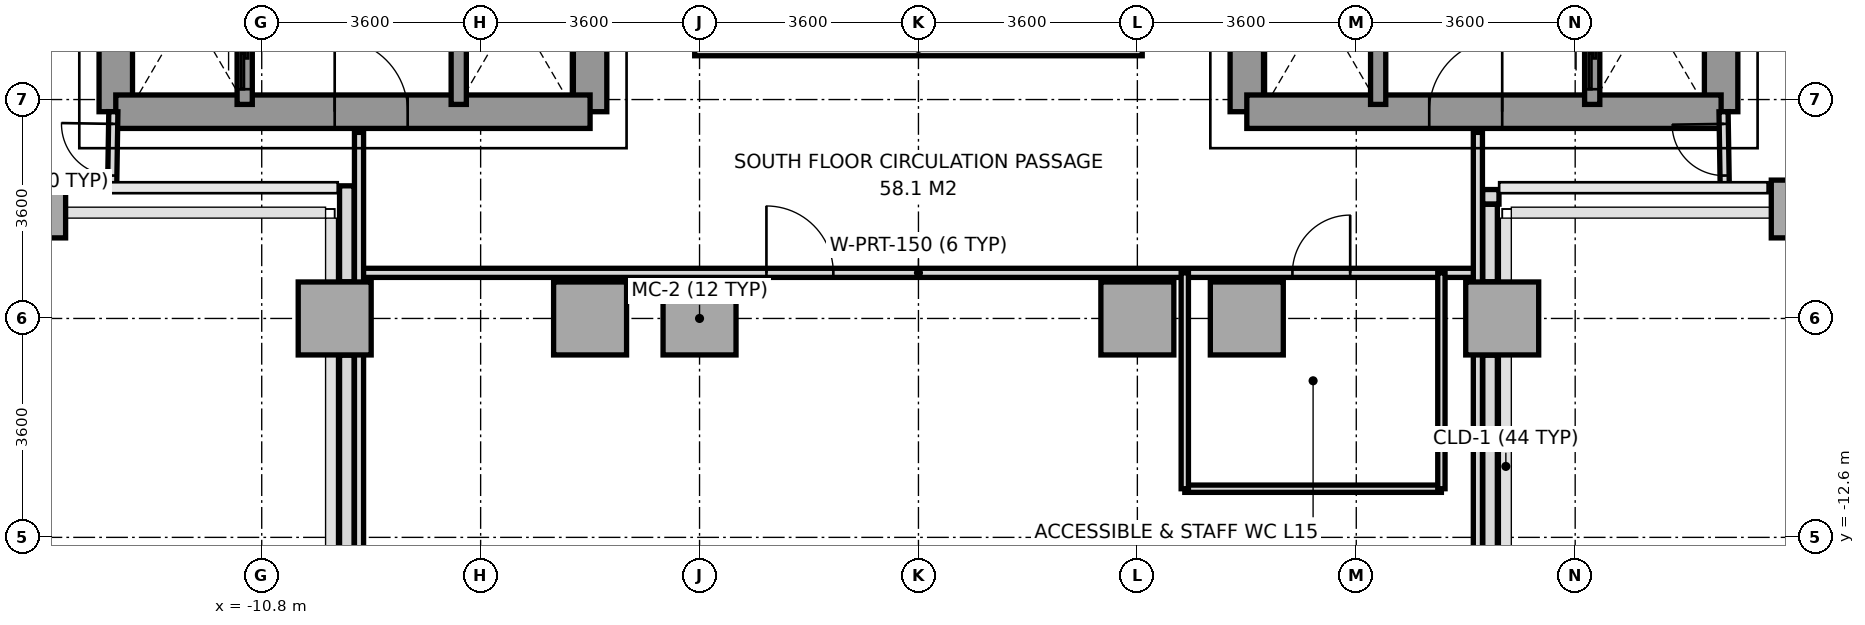
"""IFC4 building model, lengths in metres.
Left out: names, types, materials, properties, quantities, classifications, styles, units other than length and angle.
Written with IfcOpenShell. Run it as: python <this file> out.ifc"""

import sys

from ifc_helpers import new_model, si_unit, direction, frame, frame_2d, origin, origin_2d, place, context, subcontext, project, spatial, rectangle, extrude, source, transform, mapped, element, fill, save


model = new_model("IFC4")
c1 = context("Model", 3, precision=1e-05, world=origin(), true_north=direction((0.0, 1.0)))
c2 = subcontext(c1, "Body", "Model", "MODEL_VIEW")
j1 = project(units=[si_unit("LENGTHUNIT", "METRE"), si_unit("PLANEANGLEUNIT", "RADIAN")], contexts=[c1])
p1 = place(None, origin())
s1 = spatial("IfcSite", under=j1, at=p1, CompositionType="ELEMENT")
p2 = place(p1, origin())
s2 = spatial("IfcBuilding", under=s1, at=p2, CompositionType="ELEMENT")
p3 = place(p2, frame((0.0, 0.0, 61.2)))
s3 = spatial("IfcBuildingStorey", under=s2, at=p3, CompositionType="ELEMENT", Elevation=61.2)
m1 = source(origin(), c2, "Body", "SweptSolid", [
    extrude(rectangle(XDim=0.75, YDim=0.95, at=origin_2d()), origin(), (0.0, 0.0, 1.0), 3.2),
])
p4 = place(p3, frame((-14.4, -7.2, 0.0), z_axis=(0.0, 0.0, 1.0), x_axis=(1.0, 0.0, 0.0)))
e1 = element("IfcColumn", 1, at=p4, inside=s3, PredefinedType="COLUMN", context=c2, shape_type="MappedRepresentation", body=[
    mapped(m1, transform((0.0, 0.0, 0.0), x_axis=(1.0, 0.0, 0.0), y_axis=(0.0, 1.0, 0.0), z_axis=(0.0, 0.0, 1.0), scale=1.0)),
])
m2 = source(origin(), c2, "Body", "SweptSolid", [
    extrude(rectangle(XDim=1.2, YDim=1.2, at=origin_2d()), origin(), (0.0, 0.0, 1.0), 3.2),
])
for number, where, z_axis, x_axis in (
    (2, (-9.6, -9.0, 0.0), (0.0, 0.0, 1.0), (1.0, 0.0, 0.0)),
    (3, (-5.4, -9.0, 0.0), (0.0, 0.0, 1.0), (1.0, 0.0, 0.0)),
    (4, (-3.6, -9.0, 0.0), (0.0, 0.0, 1.0), (1.0, 0.0, 0.0)),
    (5, (3.6, -9.0, 0.0), (0.0, 0.0, 1.0), (1.0, 0.0, 0.0)),
    (6, (5.4, -9.0, 0.0), (0.0, 0.0, 1.0), (1.0, 0.0, 0.0)),
    (7, (9.6, -9.0, 0.0), (0.0, 0.0, 1.0), (1.0, 0.0, 0.0)),
):
    element("IfcColumn", number, at=place(p3, frame(where, z_axis=z_axis, x_axis=x_axis)), inside=s3, PredefinedType="COLUMN", context=c2, shape_type="MappedRepresentation", body=[
        mapped(m2, transform((0.0, 0.0, 0.0), x_axis=(1.0, 0.0, 0.0), y_axis=(0.0, 1.0, 0.0), z_axis=(0.0, 0.0, 1.0), scale=1.0)),
    ])
p5 = place(p3, frame((14.4, -7.2, 0.0), z_axis=(0.0, 0.0, 1.0), x_axis=(1.0, 0.0, 0.0)))
e8 = element("IfcColumn", 8, at=p5, inside=s3, PredefinedType="COLUMN", context=c2, shape_type="MappedRepresentation", body=[
    mapped(m1, transform((0.0, 0.0, 0.0), x_axis=(1.0, 0.0, 0.0), y_axis=(0.0, 1.0, 0.0), z_axis=(0.0, 0.0, 1.0), scale=1.0)),
])
p6 = place(p3, frame((9.547, -7.0, 0.0), z_axis=(0.0, 0.0, 1.0), x_axis=(-1.0, 0.0, 0.0)))
e9 = element("IfcWall", 9, at=p6, inside=s3, PredefinedType="PARAPET", context=c2, shape_type="SweptSolid", body=[
    extrude(rectangle(XDim=0.269, YDim=0.24, at=frame_2d((0.135, 0.0))), origin(), (0.0, 0.0, 1.0), 1.15),
])
p7 = place(p3, frame((9.4, -7.123, 0.0), z_axis=(0.0, 0.0, 1.0), x_axis=(0.0, -1.0, 0.0)))
e10 = element("IfcWall", 10, at=p7, inside=s3, PredefinedType="PARAPET", context=c2, shape_type="SweptSolid", body=[
    extrude(rectangle(XDim=1.274, YDim=0.24, at=frame_2d((0.637, 0.0))), origin(), (0.0, 0.0, 1.0), 1.15),
])
p8 = place(p3, frame((9.4, -9.603, 0.0), z_axis=(0.0, 0.0, 1.0), x_axis=(0.0, -1.0, 0.0)))
e11 = element("IfcWall", 11, at=p8, inside=s3, PredefinedType="PARAPET", context=c2, shape_type="SweptSolid", body=[
    extrude(rectangle(XDim=6.0, YDim=0.24, at=frame_2d((3.0, 0.0))), origin(), (0.0, 0.0, 1.0), 1.15),
])
p9 = place(p3, frame((-9.4, -15.358, 0.0), z_axis=(0.0, 0.0, 1.0), x_axis=(0.0, 1.0, 0.0)))
e12 = element("IfcWall", 12, at=p9, inside=s3, PredefinedType="PARAPET", context=c2, shape_type="SweptSolid", body=[
    extrude(rectangle(XDim=5.755, YDim=0.24, at=frame_2d((2.877, 0.0))), origin(), (0.0, 0.0, 1.0), 1.15),
])
p10 = place(p3, frame((-9.4, -8.397, 0.0), z_axis=(0.0, 0.0, 1.0), x_axis=(0.0, 1.0, 0.0)))
e13 = element("IfcWall", 13, at=p10, inside=s3, PredefinedType="PARAPET", context=c2, shape_type="SweptSolid", body=[
    extrude(rectangle(XDim=1.578, YDim=0.24, at=frame_2d((0.789, 0.0))), origin(), (0.0, 0.0, 1.0), 1.15),
])
p11 = place(p3, frame((-13.2, -5.6, 0.0), z_axis=(0.0, 0.0, 1.0), x_axis=(0.0, 1.0, 0.0)))
e14 = element("IfcWall", 14, at=p11, inside=s3, PredefinedType="SHEAR", context=c2, shape_type="SweptSolid", body=[
    extrude(rectangle(XDim=11.2, YDim=0.55, at=frame_2d((5.6, 0.0))), origin(), (0.0, 0.0, 1.0), 3.2),
])
p12 = place(p3, frame((-5.4, -5.6, 0.0), z_axis=(0.0, 0.0, 1.0), x_axis=(0.0, 1.0, 0.0)))
e15 = element("IfcWall", 15, at=p12, inside=s3, PredefinedType="SHEAR", context=c2, shape_type="SweptSolid", body=[
    extrude(rectangle(XDim=12.5, YDim=0.55, at=frame_2d((6.25, 0.0))), origin(), (0.0, 0.0, 1.0), 3.2),
])
p13 = place(p12, frame((4.55, 0.0, 0.0)))
e16 = element("IfcOpeningElement", 16, at=p13, cuts=e15, PredefinedType="OPENING", context=c2, shape_type="SweptSolid", body=[
    extrude(rectangle(XDim=1.2, YDim=2.2, at=frame_2d((0.6, 1.1))), frame((0.0, 0.285, 0.0), z_axis=(0.0, -1.0, 0.0), x_axis=(1.0, 0.0, 0.0)), (0.0, 0.0, 1.0), 0.57),
])
p14 = place(p3, frame((-13.2, -5.6, 0.0), z_axis=(0.0, 0.0, 1.0), x_axis=(1.0, 0.0, 0.0)))
e17 = element("IfcWall", 17, at=p14, inside=s3, PredefinedType="SHEAR", context=c2, shape_type="SweptSolid", body=[
    extrude(rectangle(XDim=7.8, YDim=0.55, at=frame_2d((3.9, 0.0))), origin(), (0.0, 0.0, 1.0), 3.2),
])
p15 = place(p14, frame((3.6, 0.0, 0.0)))
e18 = element("IfcOpeningElement", 18, at=p15, cuts=e17, PredefinedType="OPENING", context=c2, shape_type="SweptSolid", body=[
    extrude(rectangle(XDim=1.2, YDim=2.2, at=frame_2d((0.6, 1.1))), frame((0.0, 0.285, 0.0), z_axis=(0.0, -1.0, 0.0), x_axis=(1.0, 0.0, 0.0)), (0.0, 0.0, 1.0), 0.57),
])
p16 = place(p3, frame((13.2, -5.6, 0.0), z_axis=(0.0, 0.0, 1.0), x_axis=(0.0, 1.0, 0.0)))
e19 = element("IfcWall", 19, at=p16, inside=s3, PredefinedType="SHEAR", context=c2, shape_type="SweptSolid", body=[
    extrude(rectangle(XDim=11.2, YDim=0.55, at=frame_2d((5.6, 0.0))), origin(), (0.0, 0.0, 1.0), 3.2),
])
p17 = place(p3, frame((5.4, -5.6, 0.0), z_axis=(0.0, 0.0, 1.0), x_axis=(0.0, 1.0, 0.0)))
e20 = element("IfcWall", 20, at=p17, inside=s3, PredefinedType="SHEAR", context=c2, shape_type="SweptSolid", body=[
    extrude(rectangle(XDim=12.5, YDim=0.55, at=frame_2d((6.25, 0.0))), origin(), (0.0, 0.0, 1.0), 3.2),
])
p18 = place(p17, frame((4.55, 0.0, 0.0)))
e21 = element("IfcOpeningElement", 21, at=p18, cuts=e20, PredefinedType="OPENING", context=c2, shape_type="SweptSolid", body=[
    extrude(rectangle(XDim=1.2, YDim=2.2, at=frame_2d((0.6, 1.1))), frame((0.0, 0.285, 0.0), z_axis=(0.0, -1.0, 0.0), x_axis=(1.0, 0.0, 0.0)), (0.0, 0.0, 1.0), 0.57),
])
p19 = place(p17, frame((7.88, 0.0, 0.0)))
e22 = element("IfcOpeningElement", 22, at=p19, cuts=e20, PredefinedType="OPENING", context=c2, shape_type="SweptSolid", body=[
    extrude(rectangle(XDim=0.8, YDim=2.1, at=frame_2d((0.4, 1.05))), frame((0.0, 0.285, 0.0), z_axis=(0.0, -1.0, 0.0), x_axis=(1.0, 0.0, 0.0)), (0.0, 0.0, 1.0), 0.57),
])
p20 = place(p3, frame((5.4, -5.6, 0.0), z_axis=(0.0, 0.0, 1.0), x_axis=(1.0, 0.0, 0.0)))
e23 = element("IfcWall", 23, at=p20, inside=s3, PredefinedType="SHEAR", context=c2, shape_type="SweptSolid", body=[
    extrude(rectangle(XDim=7.8, YDim=0.55, at=frame_2d((3.9, 0.0))), origin(), (0.0, 0.0, 1.0), 3.2),
])
p21 = place(p20, frame((3.0, 0.0, 0.0)))
e24 = element("IfcOpeningElement", 24, at=p21, cuts=e23, PredefinedType="OPENING", context=c2, shape_type="SweptSolid", body=[
    extrude(rectangle(XDim=1.2, YDim=2.2, at=frame_2d((0.6, 1.1))), frame((0.0, 0.285, 0.0), z_axis=(0.0, -1.0, 0.0), x_axis=(1.0, 0.0, 0.0)), (0.0, 0.0, 1.0), 0.57),
])
p22 = place(p3, frame((-11.08, -5.48, 0.0), z_axis=(0.0, 0.0, 1.0), x_axis=(0.0, 1.0, 0.0)))
e25 = element("IfcWall", 25, at=p22, inside=s3, PredefinedType="SOLIDWALL", context=c2, shape_type="SweptSolid", body=[
    extrude(rectangle(XDim=1.6, YDim=0.25, at=frame_2d((0.8, 0.0))), origin(), (0.0, 0.0, 1.0), 3.2),
])
p23 = place(p22, frame((0.25, 0.0, 0.0)))
e26 = element("IfcOpeningElement", 26, at=p23, cuts=e25, PredefinedType="OPENING", context=c2, shape_type="SweptSolid", body=[
    extrude(rectangle(XDim=1.1, YDim=2.2, at=frame_2d((0.55, 1.1))), frame((0.0, 0.135, 0.0), z_axis=(0.0, -1.0, 0.0), x_axis=(1.0, 0.0, 0.0)), (0.0, 0.0, 1.0), 0.27),
])
p24 = place(p3, frame((11.08, -5.48, 0.0), z_axis=(0.0, 0.0, 1.0), x_axis=(0.0, 1.0, 0.0)))
e27 = element("IfcWall", 27, at=p24, inside=s3, PredefinedType="SOLIDWALL", context=c2, shape_type="SweptSolid", body=[
    extrude(rectangle(XDim=1.6, YDim=0.25, at=frame_2d((0.8, 0.0))), origin(), (0.0, 0.0, 1.0), 3.2),
])
p25 = place(p24, frame((0.25, 0.0, 0.0)))
e28 = element("IfcOpeningElement", 28, at=p25, cuts=e27, PredefinedType="OPENING", context=c2, shape_type="SweptSolid", body=[
    extrude(rectangle(XDim=1.1, YDim=2.2, at=frame_2d((0.55, 1.1))), frame((0.0, 0.135, 0.0), z_axis=(0.0, -1.0, 0.0), x_axis=(1.0, 0.0, 0.0)), (0.0, 0.0, 1.0), 0.27),
])
for number, where, z_axis, x_axis in (
    (29, (-7.56, -5.48, 0.0), (0.0, 0.0, 1.0), (0.0, 1.0, 0.0)),
    (30, (7.56, -5.48, 0.0), (0.0, 0.0, 1.0), (0.0, 1.0, 0.0)),
):
    element("IfcWall", number, at=place(p3, frame(where, z_axis=z_axis, x_axis=x_axis)), inside=s3, PredefinedType="SOLIDWALL", context=c2, shape_type="SweptSolid", body=[
        extrude(rectangle(XDim=1.6, YDim=0.25, at=frame_2d((0.8, 0.0))), origin(), (0.0, 0.0, 1.0), 3.2),
    ])
p26 = place(p3, frame((-9.2, -8.25, 0.0), z_axis=(0.0, 0.0, 1.0), x_axis=(1.0, 0.0, 0.0)))
e31 = element("IfcWall", 31, at=p26, inside=s3, PredefinedType="PARTITIONING", context=c2, shape_type="SweptSolid", body=[
    extrude(rectangle(XDim=18.4, YDim=0.15, at=frame_2d((9.2, 0.0))), origin(), (0.0, 0.0, 1.0), 2.7),
])
p27 = place(p26, frame((15.35, 0.0, 0.0)))
e32 = element("IfcOpeningElement", 32, at=p27, cuts=e31, PredefinedType="OPENING", context=c2, shape_type="SweptSolid", body=[
    extrude(rectangle(XDim=0.95, YDim=2.15, at=frame_2d((0.475, 1.075))), frame((0.0, 0.085, 0.0), z_axis=(0.0, -1.0, 0.0), x_axis=(1.0, 0.0, 0.0)), (0.0, 0.0, 1.0), 0.17),
])
p28 = place(p26, frame((6.7, 0.0, 0.0)))
e33 = element("IfcOpeningElement", 33, at=p28, cuts=e31, PredefinedType="OPENING", context=c2, shape_type="SweptSolid", body=[
    extrude(rectangle(XDim=1.1, YDim=2.2, at=frame_2d((0.55, 1.1))), frame((0.0, 0.085, 0.0), z_axis=(0.0, -1.0, 0.0), x_axis=(1.0, 0.0, 0.0)), (0.0, 0.0, 1.0), 0.17),
])
for number, where, z_axis, x_axis in (
    (34, (-9.2, -15.68, 0.0), (0.0, 0.0, 1.0), (0.0, 1.0, 0.0)),
    (35, (9.2, -15.68, 0.0), (0.0, 0.0, 1.0), (0.0, 1.0, 0.0)),
):
    element("IfcWall", number, at=place(p3, frame(where, z_axis=z_axis, x_axis=x_axis)), inside=s3, PredefinedType="PARTITIONING", context=c2, shape_type="SweptSolid", body=[
        extrude(rectangle(XDim=9.74, YDim=0.15, at=frame_2d((4.87, 0.0))), origin(), (0.0, 0.0, 1.0), 2.71),
    ])
p29 = place(p3, frame((4.38, -11.8, 0.0), z_axis=(0.0, 0.0, 1.0), x_axis=(1.0, 0.0, 0.0)))
e36 = element("IfcWall", 36, at=p29, inside=s3, PredefinedType="PARTITIONING", context=c2, shape_type="SweptSolid", body=[
    extrude(rectangle(XDim=4.22, YDim=0.12, at=frame_2d((2.11, 0.0))), origin(), (0.0, 0.0, 1.0), 3.2),
])
p30 = place(p3, frame((4.38, -11.8, 0.0), z_axis=(0.0, 0.0, 1.0), x_axis=(0.0, 1.0, 0.0)))
e37 = element("IfcWall", 37, at=p30, inside=s3, PredefinedType="PARTITIONING", context=c2, shape_type="SweptSolid", body=[
    extrude(rectangle(XDim=3.55, YDim=0.12, at=frame_2d((1.775, 0.0))), origin(), (0.0, 0.0, 1.0), 3.2),
])
p31 = place(p3, frame((8.6, -11.8, 0.0), z_axis=(0.0, 0.0, 1.0), x_axis=(0.0, 1.0, 0.0)))
e38 = element("IfcWall", 38, at=p31, inside=s3, PredefinedType="PARTITIONING", context=c2, shape_type="SweptSolid", body=[
    extrude(rectangle(XDim=3.55, YDim=0.12, at=frame_2d((1.775, 0.0))), origin(), (0.0, 0.0, 1.0), 2.71),
])
p32 = place(p3, frame((-13.26, -6.85, 0.0), z_axis=(0.0, 0.0, 1.0), x_axis=(0.016013571389, 0.999871774545, 0.0)))
e39 = element("IfcWall", 39, at=p32, inside=s3, PredefinedType="PARTITIONING", context=c2, shape_type="SweptSolid", body=[
    extrude(rectangle(XDim=1.25, YDim=0.15, at=frame_2d((0.625, 0.0))), origin(), (0.0, 0.0, 1.0), 3.2),
])
p33 = place(p32, frame((0.2, 0.0, 0.0)))
e40 = element("IfcOpeningElement", 40, at=p33, cuts=e39, PredefinedType="OPENING", context=c2, shape_type="SweptSolid", body=[
    extrude(rectangle(XDim=0.85, YDim=2.1, at=frame_2d((0.425, 1.05))), frame((0.0, 0.085, 0.0), z_axis=(0.0, -1.0, 0.0), x_axis=(1.0, 0.0, 0.0)), (0.0, 0.0, 1.0), 0.17),
])
p34 = place(p3, frame((13.26, -6.85, 0.0), z_axis=(0.0, 0.0, 1.0), x_axis=(-0.016013571389, 0.999871774545, 0.0)))
e41 = element("IfcWall", 41, at=p34, inside=s3, PredefinedType="PARTITIONING", context=c2, shape_type="SweptSolid", body=[
    extrude(rectangle(XDim=1.25, YDim=0.15, at=frame_2d((0.625, 0.0))), origin(), (0.0, 0.0, 1.0), 3.2),
])
p35 = place(p34, frame((0.2, 0.0, 0.0)))
e42 = element("IfcOpeningElement", 42, at=p35, cuts=e41, PredefinedType="OPENING", context=c2, shape_type="SweptSolid", body=[
    extrude(rectangle(XDim=0.85, YDim=2.1, at=frame_2d((0.425, 1.05))), frame((0.0, 0.085, 0.0), z_axis=(0.0, -1.0, 0.0), x_axis=(1.0, 0.0, 0.0)), (0.0, 0.0, 1.0), 0.17),
])
p36 = place(p3, frame((-3.68, -4.56, 0.0), z_axis=(0.0, 0.0, 1.0), x_axis=(1.0, 0.0, 0.0)))
e43 = element("IfcWall", 43, at=p36, inside=s3, PredefinedType="PARAPET", context=c2, shape_type="SweptSolid", body=[
    extrude(rectangle(XDim=7.36, YDim=0.24, at=frame_2d((3.68, 0.0))), origin(), (0.0, 0.0, 1.0), 1.15),
])
m3 = source(origin(), c2, "Body", "SweptSolid", [
    extrude(rectangle(XDim=1.2, YDim=2.2, at=frame_2d((0.6, 1.1))), frame((0.0, 0.025, 0.0), z_axis=(0.0, -1.0, 0.0), x_axis=(1.0, 0.0, 0.0)), (0.0, 0.0, 1.0), 0.05),
])
p37 = place(p15, origin())
e44 = element("IfcDoor", 44, at=p37, inside=s3, OperationType="SINGLE_SWING_LEFT", PredefinedType="DOOR", context=c2, shape_type="MappedRepresentation", body=[
    mapped(m3, transform((0.0, 0.0, 0.0), x_axis=(1.0, 0.0, 0.0), y_axis=(0.0, 1.0, 0.0), z_axis=(0.0, 0.0, 1.0), scale=1.0)),
])
fill(e18, e44)
p38 = place(p21, origin())
e45 = element("IfcDoor", 45, at=p38, inside=s3, OperationType="SINGLE_SWING_RIGHT", PredefinedType="DOOR", context=c2, shape_type="MappedRepresentation", body=[
    mapped(m3, transform((0.0, 0.0, 0.0), x_axis=(1.0, 0.0, 0.0), y_axis=(0.0, 1.0, 0.0), z_axis=(0.0, 0.0, 1.0), scale=1.0)),
])
fill(e24, e45)
m4 = source(origin(), c2, "Body", "SweptSolid", [
    extrude(rectangle(XDim=1.1, YDim=2.2, at=frame_2d((0.55, 1.1))), frame((0.0, 0.025, 0.0), z_axis=(0.0, -1.0, 0.0), x_axis=(1.0, 0.0, 0.0)), (0.0, 0.0, 1.0), 0.05),
])
p39 = place(p23, origin())
e46 = element("IfcDoor", 46, at=p39, inside=s3, OperationType="SLIDING_TO_LEFT", PredefinedType="DOOR", context=c2, shape_type="MappedRepresentation", body=[
    mapped(m4, transform((0.0, 0.0, 0.0), x_axis=(1.0, 0.0, 0.0), y_axis=(0.0, 1.0, 0.0), z_axis=(0.0, 0.0, 1.0), scale=1.0)),
])
fill(e26, e46)
p40 = place(p25, origin())
e47 = element("IfcDoor", 47, at=p40, inside=s3, OperationType="SLIDING_TO_LEFT", PredefinedType="DOOR", context=c2, shape_type="MappedRepresentation", body=[
    mapped(m4, transform((0.0, 0.0, 0.0), x_axis=(1.0, 0.0, 0.0), y_axis=(0.0, 1.0, 0.0), z_axis=(0.0, 0.0, 1.0), scale=1.0)),
])
fill(e28, e47)
m5 = source(origin(), c2, "Body", "SweptSolid", [
    extrude(rectangle(XDim=0.95, YDim=2.15, at=frame_2d((0.475, 1.075))), frame((0.0, 0.025, 0.0), z_axis=(0.0, -1.0, 0.0), x_axis=(1.0, 0.0, 0.0)), (0.0, 0.0, 1.0), 0.05),
])
p41 = place(p27, origin())
e48 = element("IfcDoor", 48, at=p41, inside=s3, OperationType="SINGLE_SWING_RIGHT", PredefinedType="DOOR", context=c2, shape_type="MappedRepresentation", body=[
    mapped(m5, transform((0.0, 0.0, 0.0), x_axis=(1.0, 0.0, 0.0), y_axis=(0.0, 1.0, 0.0), z_axis=(0.0, 0.0, 1.0), scale=1.0)),
])
fill(e32, e48)
p42 = place(p28, origin())
e49 = element("IfcDoor", 49, at=p42, inside=s3, OperationType="SINGLE_SWING_LEFT", PredefinedType="DOOR", context=c2, shape_type="MappedRepresentation", body=[
    mapped(m4, transform((0.0, 0.0, 0.0), x_axis=(1.0, 0.0, 0.0), y_axis=(0.0, 1.0, 0.0), z_axis=(0.0, 0.0, 1.0), scale=1.0)),
])
fill(e33, e49)
m6 = source(origin(), c2, "Body", "SweptSolid", [
    extrude(rectangle(XDim=0.85, YDim=2.1, at=frame_2d((0.425, 1.05))), frame((0.0, 0.025, 0.0), z_axis=(0.0, -1.0, 0.0), x_axis=(1.0, 0.0, 0.0)), (0.0, 0.0, 1.0), 0.05),
])
p43 = place(p33, origin())
e50 = element("IfcDoor", 50, at=p43, inside=s3, OperationType="SINGLE_SWING_RIGHT", PredefinedType="DOOR", context=c2, shape_type="MappedRepresentation", body=[
    mapped(m6, transform((0.0, 0.0, 0.0), x_axis=(1.0, 0.0, 0.0), y_axis=(0.0, 1.0, 0.0), z_axis=(0.0, 0.0, 1.0), scale=1.0)),
])
fill(e40, e50)
p44 = place(p35, origin())
e51 = element("IfcDoor", 51, at=p44, inside=s3, OperationType="SINGLE_SWING_RIGHT", PredefinedType="DOOR", context=c2, shape_type="MappedRepresentation", body=[
    mapped(m6, transform((0.0, 0.0, 0.0), x_axis=(1.0, 0.0, 0.0), y_axis=(0.0, 1.0, 0.0), z_axis=(0.0, 0.0, 1.0), scale=1.0)),
])
fill(e42, e51)
save(model, sys.argv[1])
